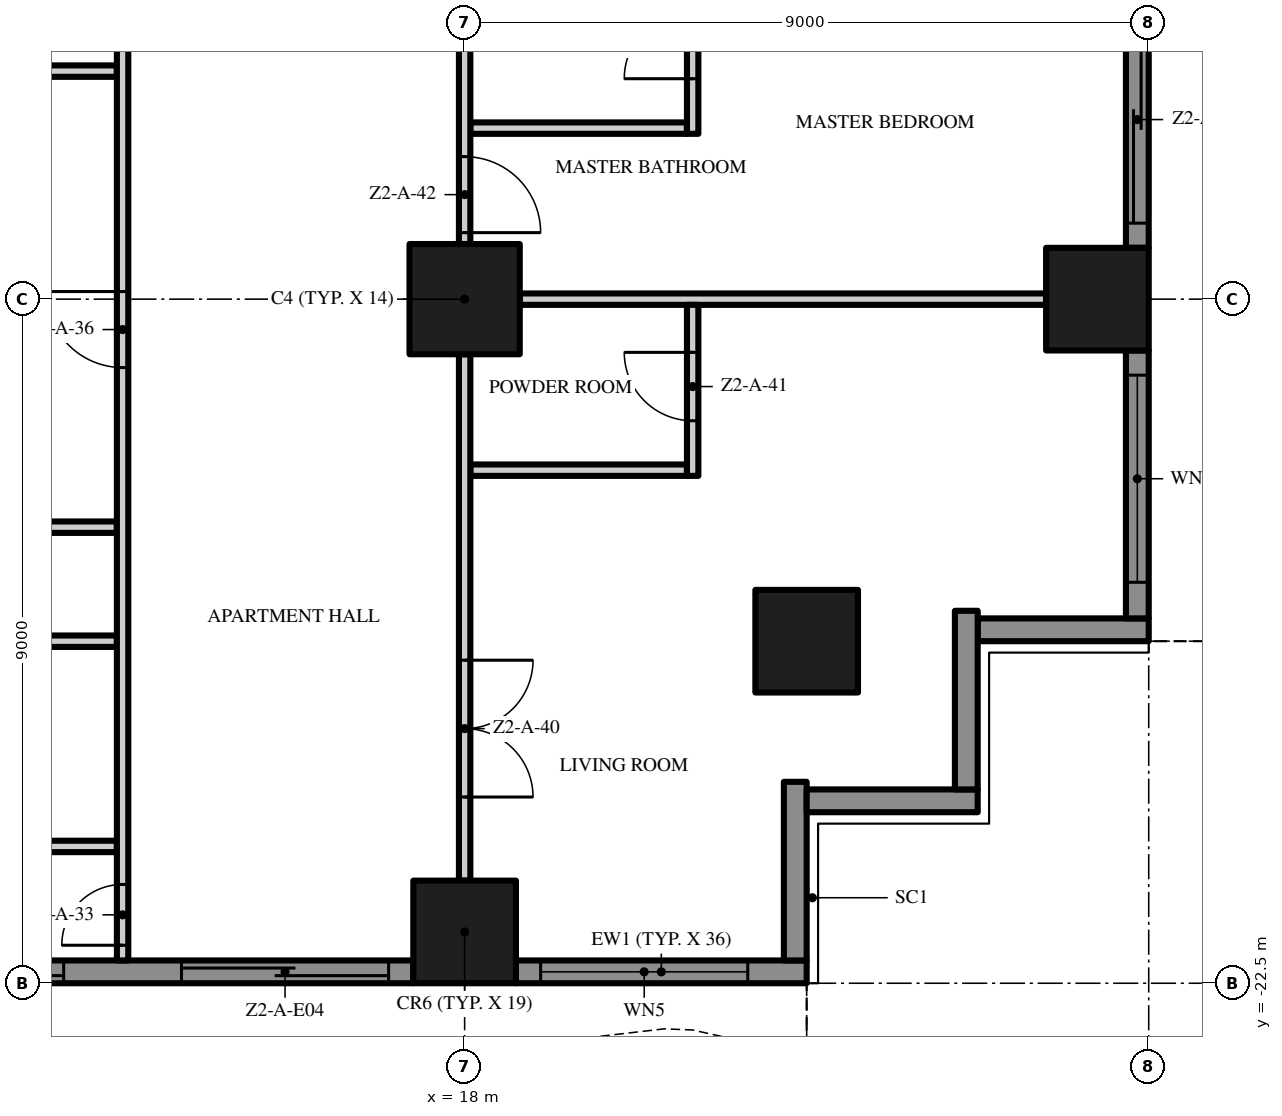
"""IFC4 building model, lengths in metres.
Left out: names, types, materials, properties, quantities, classifications, styles, units other than length and angle.
Written with IfcOpenShell. Run it as: python <this file> out.ifc"""

import sys

from ifc_helpers import new_model, si_unit, direction, frame, frame_2d, origin, origin_2d, place, context, subcontext, project, spatial, polyline, rectangle, outline, extrude, element, fill, save


model = new_model("IFC4")
c1 = context("Model", 3, precision=1e-05, world=origin(), true_north=direction((0.0, 1.0)))
c2 = subcontext(c1, "Body", "Model", "MODEL_VIEW")
j1 = project(units=[si_unit("LENGTHUNIT", "METRE"), si_unit("PLANEANGLEUNIT", "RADIAN")], contexts=[c1])
p1 = place(None, origin())
s1 = spatial("IfcSite", under=j1, at=p1, CompositionType="ELEMENT")
p2 = place(p1, origin())
s2 = spatial("IfcBuilding", under=s1, at=p2, CompositionType="ELEMENT")
p3 = place(p2, frame((0.0, 0.0, 73.2)))
s3 = spatial("IfcBuildingStorey", under=s2, at=p3, CompositionType="ELEMENT", Elevation=73.2)
p4 = place(p3, frame((18.0, -13.5, 0.0), z_axis=(0.0, 0.0, 1.0), x_axis=(1.0, 0.0, 0.0)))
e1 = element("IfcColumn", 1, at=p4, inside=s3, PredefinedType="COLUMN", context=c2, shape_type="SweptSolid", body=[
    extrude(rectangle(XDim=1.45, YDim=1.45, at=origin_2d()), origin(), (0.0, 0.0, 1.0), 3.5),
])
for number, where, z_axis, x_axis in (
    (2, (18.0, -21.825, 0.0), (0.0, 0.0, 1.0), (1.0, 0.0, 0.0)),
    (3, (26.325, -13.5, 0.0), (0.0, 0.0, 1.0), (1.0, 0.0, 0.0)),
    (4, (22.5, -18.0, 0.0), (0.0, 0.0, 1.0), (1.0, 0.0, 0.0)),
):
    element("IfcColumn", number, at=place(p3, frame(where, z_axis=z_axis, x_axis=x_axis)), inside=s3, PredefinedType="COLUMN", context=c2, shape_type="SweptSolid", body=[
        extrude(rectangle(XDim=1.35, YDim=1.35, at=origin_2d()), origin(), (0.0, 0.0, 1.0), 3.5),
    ])
p5 = place(p3, frame((17.325, -22.35, 0.0), z_axis=(0.0, 0.0, 1.0), x_axis=(-1.0, 0.0, 0.0)))
e5 = element("IfcWall", 5, at=p5, inside=s3, PredefinedType="SOLIDWALL", context=c2, shape_type="SweptSolid", body=[
    extrude(rectangle(XDim=7.65, YDim=0.3, at=frame_2d((3.825, 0.0))), origin(), (0.0, 0.0, 1.0), 3.5),
])
p6 = place(p5, frame((4.6, 0.0, 0.0)))
e6 = element("IfcOpeningElement", 6, at=p6, cuts=e5, PredefinedType="OPENING", context=c2, shape_type="SweptSolid", body=[
    extrude(rectangle(XDim=2.725, YDim=2.4, at=frame_2d((1.363, 1.2))), frame((0.0, 0.16, 0.0), z_axis=(0.0, -1.0, 0.0), x_axis=(1.0, 0.0, 0.0)), (0.0, 0.0, 1.0), 0.32),
])
p7 = place(p5, frame((0.325, 0.0, 0.0)))
e7 = element("IfcOpeningElement", 7, at=p7, cuts=e5, PredefinedType="OPENING", context=c2, shape_type="SweptSolid", body=[
    extrude(rectangle(XDim=2.725, YDim=2.4, at=frame_2d((1.363, 1.2))), frame((0.0, 0.16, 0.0), z_axis=(0.0, -1.0, 0.0), x_axis=(1.0, 0.0, 0.0)), (0.0, 0.0, 1.0), 0.32),
])
p8 = place(p3, frame((22.5, -22.35, 0.0), z_axis=(0.0, 0.0, 1.0), x_axis=(-1.0, 0.0, 0.0)))
e8 = element("IfcWall", 8, at=p8, inside=s3, PredefinedType="SOLIDWALL", context=c2, shape_type="SweptSolid", body=[
    extrude(rectangle(XDim=3.825, YDim=0.3, at=frame_2d((1.913, 0.0))), origin(), (0.0, 0.0, 1.0), 3.5),
])
p9 = place(p8, frame((0.775, 0.0, 0.45)))
e9 = element("IfcOpeningElement", 9, at=p9, cuts=e8, PredefinedType="OPENING", context=c2, shape_type="SweptSolid", body=[
    extrude(rectangle(XDim=2.725, YDim=2.65, at=frame_2d((1.363, 1.325))), frame((0.0, 0.16, 0.0), z_axis=(0.0, -1.0, 0.0), x_axis=(1.0, 0.0, 0.0)), (0.0, 0.0, 1.0), 0.32),
])
p10 = place(p3, frame((22.35, -19.85, 0.0), z_axis=(0.0, 0.0, 1.0), x_axis=(0.0, -1.0, 0.0)))
e10 = element("IfcWall", 10, at=p10, inside=s3, PredefinedType="SOLIDWALL", context=c2, shape_type="SweptSolid", body=[
    extrude(rectangle(XDim=2.35, YDim=0.3, at=frame_2d((1.175, 0.0))), origin(), (0.0, 0.0, 1.0), 3.5),
])
p11 = place(p3, frame((24.75, -20.1, 0.0), z_axis=(0.0, 0.0, 1.0), x_axis=(-1.0, 0.0, 0.0)))
e11 = element("IfcWall", 11, at=p11, inside=s3, PredefinedType="SOLIDWALL", context=c2, shape_type="SweptSolid", body=[
    extrude(rectangle(XDim=2.25, YDim=0.3, at=frame_2d((1.125, 0.0))), origin(), (0.0, 0.0, 1.0), 3.5),
])
p12 = place(p3, frame((24.6, -17.6, 0.0), z_axis=(0.0, 0.0, 1.0), x_axis=(0.0, -1.0, 0.0)))
e12 = element("IfcWall", 12, at=p12, inside=s3, PredefinedType="SOLIDWALL", context=c2, shape_type="SweptSolid", body=[
    extrude(rectangle(XDim=2.35, YDim=0.3, at=frame_2d((1.175, 0.0))), origin(), (0.0, 0.0, 1.0), 3.5),
])
p13 = place(p3, frame((27.0, -17.85, 0.0), z_axis=(0.0, 0.0, 1.0), x_axis=(-1.0, 0.0, 0.0)))
e13 = element("IfcWall", 13, at=p13, inside=s3, PredefinedType="SOLIDWALL", context=c2, shape_type="SweptSolid", body=[
    extrude(rectangle(XDim=2.25, YDim=0.3, at=frame_2d((1.125, 0.0))), origin(), (0.0, 0.0, 1.0), 3.5),
])
p14 = place(p3, frame((26.85, -14.175, 0.0), z_axis=(0.0, 0.0, 1.0), x_axis=(0.0, -1.0, 0.0)))
e14 = element("IfcWall", 14, at=p14, inside=s3, PredefinedType="SOLIDWALL", context=c2, shape_type="SweptSolid", body=[
    extrude(rectangle(XDim=3.525, YDim=0.3, at=frame_2d((1.762, 0.0))), origin(), (0.0, 0.0, 1.0), 3.5),
])
p15 = place(p14, frame((0.325, 0.0, 0.45)))
e15 = element("IfcOpeningElement", 15, at=p15, cuts=e14, PredefinedType="OPENING", context=c2, shape_type="SweptSolid", body=[
    extrude(rectangle(XDim=2.725, YDim=2.65, at=frame_2d((1.363, 1.325))), frame((0.0, 0.16, 0.0), z_axis=(0.0, -1.0, 0.0), x_axis=(1.0, 0.0, 0.0)), (0.0, 0.0, 1.0), 0.32),
])
p16 = place(p3, frame((26.85, -5.175, 0.0), z_axis=(0.0, 0.0, 1.0), x_axis=(0.0, -1.0, 0.0)))
e16 = element("IfcWall", 16, at=p16, inside=s3, PredefinedType="SOLIDWALL", context=c2, shape_type="SweptSolid", body=[
    extrude(rectangle(XDim=7.65, YDim=0.3, at=frame_2d((3.825, 0.0))), origin(), (0.0, 0.0, 1.0), 3.5),
])
p17 = place(p16, frame((4.6, 0.0, 0.0)))
e17 = element("IfcOpeningElement", 17, at=p17, cuts=e16, PredefinedType="OPENING", context=c2, shape_type="SweptSolid", body=[
    extrude(rectangle(XDim=2.725, YDim=2.4, at=frame_2d((1.363, 1.2))), frame((0.0, 0.16, 0.0), z_axis=(0.0, -1.0, 0.0), x_axis=(1.0, 0.0, 0.0)), (0.0, 0.0, 1.0), 0.32),
])
p18 = place(p16, frame((0.325, 0.0, 0.45)))
e18 = element("IfcOpeningElement", 18, at=p18, cuts=e16, PredefinedType="OPENING", context=c2, shape_type="SweptSolid", body=[
    extrude(rectangle(XDim=2.725, YDim=2.65, at=frame_2d((1.363, 1.325))), frame((0.0, 0.16, 0.0), z_axis=(0.0, -1.0, 0.0), x_axis=(1.0, 0.0, 0.0)), (0.0, 0.0, 1.0), 0.32),
])
p19 = place(p3, origin())
e19 = element("IfcWall", 19, at=p19, inside=s3, PredefinedType="USERDEFINED", context=c2, shape_type="SweptSolid", body=[
    extrude(outline(polyline([(-22.5, -23.451), (-21.0, -24.112), (-19.5, -24.845), (-18.0, -25.369), (-16.875, -25.5), (-16.5, -25.485), (-15.0, -25.149), (-13.5, -24.488), (-12.0, -23.755), (-10.5, -23.231), (-9.375, -23.1), (-9.0, -23.115), (-7.5, -23.451), (-6.0, -24.112), (-4.5, -24.845), (-3.0, -25.369), (-1.875, -25.5), (-1.5, -25.485), (0.0, -25.149), (1.5, -24.488), (3.0, -23.755), (4.5, -23.231), (5.625, -23.1), (6.0, -23.115), (7.5, -23.451), (9.0, -24.112), (10.5, -24.845), (12.0, -25.369), (13.125, -25.5), (13.5, -25.485), (15.0, -25.149), (16.5, -24.488), (18.0, -23.755), (19.5, -23.231), (20.625, -23.1), (21.0, -23.115), (22.5, -23.451), (22.555, -23.208), (21.033, -22.866), (20.615, -22.849), (19.444, -22.986), (17.904, -23.524), (16.395, -24.261), (14.921, -24.91), (13.467, -25.236), (13.135, -25.249), (12.056, -25.124), (10.596, -24.614), (9.105, -23.885), (7.579, -23.213), (6.033, -22.866), (5.615, -22.849), (4.444, -22.986), (2.904, -23.524), (1.395, -24.261), (-0.079, -24.91), (-1.533, -25.236), (-1.865, -25.249), (-2.944, -25.124), (-4.404, -24.614), (-5.895, -23.885), (-7.421, -23.213), (-8.967, -22.866), (-9.385, -22.849), (-10.556, -22.986), (-12.096, -23.524), (-13.605, -24.261), (-15.079, -24.91), (-16.533, -25.236), (-16.865, -25.249), (-17.944, -25.124), (-19.404, -24.614), (-20.895, -23.885), (-22.399, -23.223), (-22.5, -23.451)])), origin(), (0.0, 0.0, 1.0), 0.9),
])
p20 = place(p3, origin())
e20 = element("IfcWall", 20, at=p20, inside=s3, PredefinedType="USERDEFINED", context=c2, shape_type="SweptSolid", body=[
    extrude(outline(polyline([(27.951, -18.0), (28.612, -16.5), (29.345, -15.0), (29.869, -13.5), (30.0, -12.375), (29.985, -12.0), (29.649, -10.5), (28.988, -9.0), (28.255, -7.5), (27.731, -6.0), (27.6, -4.875), (27.615, -4.5), (27.951, -3.0), (28.612, -1.5), (29.345, 0.0), (29.869, 1.5), (30.0, 2.625), (29.985, 3.0), (29.649, 4.5), (28.988, 6.0), (28.255, 7.5), (27.731, 9.0), (27.6, 10.125), (27.615, 10.5), (27.951, 12.0), (28.612, 13.5), (29.345, 15.0), (29.869, 16.5), (30.0, 17.625), (29.985, 18.0), (29.735, 17.99), (29.749, 17.635), (29.624, 16.556), (29.114, 15.096), (28.385, 13.605), (27.713, 12.079), (27.366, 10.533), (27.349, 10.115), (27.486, 8.944), (28.024, 7.404), (28.761, 5.895), (29.41, 4.421), (29.736, 2.967), (29.749, 2.635), (29.624, 1.556), (29.114, 0.096), (28.385, -1.395), (27.713, -2.921), (27.366, -4.467), (27.349, -4.885), (27.486, -6.056), (28.024, -7.596), (28.761, -9.105), (29.41, -10.579), (29.736, -12.033), (29.749, -12.365), (29.624, -13.444), (29.114, -14.904), (28.385, -16.395), (27.723, -17.899), (27.951, -18.0)])), origin(), (0.0, 0.0, 1.0), 0.9),
])
for number, where, z_axis, x_axis in (
    (21, (9.075, -20.7, 0.0), (0.0, 0.0, 1.0), (1.0, 0.0, 0.0)),
    (22, (9.075, -18.0, 0.0), (0.0, 0.0, 1.0), (1.0, 0.0, 0.0)),
    (23, (9.075, -16.5, 0.0), (0.0, 0.0, 1.0), (1.0, 0.0, 0.0)),
):
    element("IfcWall", number, at=place(p3, frame(where, z_axis=z_axis, x_axis=x_axis)), inside=s3, PredefinedType="PARTITIONING", context=c2, shape_type="SweptSolid", body=[
        extrude(rectangle(XDim=4.35, YDim=0.15, at=frame_2d((2.175, 0.0))), origin(), (0.0, 0.0, 1.0), 3.5),
    ])
p21 = place(p3, frame((18.075, -15.75, 0.0), z_axis=(0.0, 0.0, 1.0), x_axis=(1.0, 0.0, 0.0)))
e24 = element("IfcWall", 24, at=p21, inside=s3, PredefinedType="PARTITIONING", context=c2, shape_type="SweptSolid", body=[
    extrude(rectangle(XDim=2.85, YDim=0.15, at=frame_2d((1.425, 0.0))), origin(), (0.0, 0.0, 1.0), 3.5),
])
p22 = place(p3, frame((18.725, -13.5, 0.0), z_axis=(0.0, 0.0, 1.0), x_axis=(1.0, 0.0, 0.0)))
e25 = element("IfcWall", 25, at=p22, inside=s3, PredefinedType="PARTITIONING", context=c2, shape_type="SweptSolid", body=[
    extrude(rectangle(XDim=6.925, YDim=0.15, at=frame_2d((3.462, 0.0))), origin(), (0.0, 0.0, 1.0), 3.5),
])
p23 = place(p3, frame((18.075, -11.25, 0.0), z_axis=(0.0, 0.0, 1.0), x_axis=(1.0, 0.0, 0.0)))
e26 = element("IfcWall", 26, at=p23, inside=s3, PredefinedType="PARTITIONING", context=c2, shape_type="SweptSolid", body=[
    extrude(rectangle(XDim=2.85, YDim=0.15, at=frame_2d((1.425, 0.0))), origin(), (0.0, 0.0, 1.0), 3.5),
])
p24 = place(p3, frame((9.075, -10.5, 0.0), z_axis=(0.0, 0.0, 1.0), x_axis=(1.0, 0.0, 0.0)))
e27 = element("IfcWall", 27, at=p24, inside=s3, PredefinedType="PARTITIONING", context=c2, shape_type="SweptSolid", body=[
    extrude(rectangle(XDim=4.35, YDim=0.15, at=frame_2d((2.175, 0.0))), origin(), (0.0, 0.0, 1.0), 3.5),
])
p25 = place(p3, frame((13.5, -22.2, 0.0), z_axis=(0.0, 0.0, 1.0), x_axis=(0.0, 1.0, 0.0)))
e28 = element("IfcWall", 28, at=p25, inside=s3, PredefinedType="PARTITIONING", context=c2, shape_type="SweptSolid", body=[
    extrude(rectangle(XDim=14.025, YDim=0.15, at=frame_2d((7.013, 0.0))), origin(), (0.0, 0.0, 1.0), 3.5),
])
p26 = place(p25, frame((0.2, 0.0, 0.0)))
e29 = element("IfcOpeningElement", 29, at=p26, cuts=e28, PredefinedType="OPENING", context=c2, shape_type="SweptSolid", body=[
    extrude(rectangle(XDim=0.8, YDim=2.0, at=frame_2d((0.4, 1.0))), frame((0.0, 0.085, 0.0), z_axis=(0.0, -1.0, 0.0), x_axis=(1.0, 0.0, 0.0)), (0.0, 0.0, 1.0), 0.17),
])
p27 = place(p25, frame((7.8, 0.0, 0.0)))
e30 = element("IfcOpeningElement", 30, at=p27, cuts=e28, PredefinedType="OPENING", context=c2, shape_type="SweptSolid", body=[
    extrude(rectangle(XDim=1.0, YDim=2.4, at=frame_2d((0.5, 1.2))), frame((0.0, 0.085, 0.0), z_axis=(0.0, -1.0, 0.0), x_axis=(1.0, 0.0, 0.0)), (0.0, 0.0, 1.0), 0.17),
])
p28 = place(p3, frame((18.0, -14.225, 0.0), z_axis=(0.0, 0.0, 1.0), x_axis=(0.0, -1.0, 0.0)))
e31 = element("IfcWall", 31, at=p28, inside=s3, PredefinedType="PARTITIONING", context=c2, shape_type="SweptSolid", body=[
    extrude(rectangle(XDim=6.925, YDim=0.15, at=frame_2d((3.462, 0.0))), origin(), (0.0, 0.0, 1.0), 3.5),
])
p29 = place(p28, frame((4.025, 0.0, 0.0)))
e32 = element("IfcOpeningElement", 32, at=p29, cuts=e31, PredefinedType="OPENING", context=c2, shape_type="SweptSolid", body=[
    extrude(rectangle(XDim=1.8, YDim=2.4, at=frame_2d((0.9, 1.2))), frame((0.0, 0.085, 0.0), z_axis=(0.0, -1.0, 0.0), x_axis=(1.0, 0.0, 0.0)), (0.0, 0.0, 1.0), 0.17),
])
p30 = place(p3, frame((18.0, -5.225, 0.0), z_axis=(0.0, 0.0, 1.0), x_axis=(0.0, -1.0, 0.0)))
e33 = element("IfcWall", 33, at=p30, inside=s3, PredefinedType="PARTITIONING", context=c2, shape_type="SweptSolid", body=[
    extrude(rectangle(XDim=7.55, YDim=0.15, at=frame_2d((3.775, 0.0))), origin(), (0.0, 0.0, 1.0), 3.5),
])
p31 = place(p30, frame((6.4, 0.0, 0.0)))
e34 = element("IfcOpeningElement", 34, at=p31, cuts=e33, PredefinedType="OPENING", context=c2, shape_type="SweptSolid", body=[
    extrude(rectangle(XDim=1.0, YDim=2.4, at=frame_2d((0.5, 1.2))), frame((0.0, 0.085, 0.0), z_axis=(0.0, -1.0, 0.0), x_axis=(1.0, 0.0, 0.0)), (0.0, 0.0, 1.0), 0.17),
])
p32 = place(p30, frame((0.15, 0.0, 0.0)))
e35 = element("IfcOpeningElement", 35, at=p32, cuts=e33, PredefinedType="OPENING", context=c2, shape_type="SweptSolid", body=[
    extrude(rectangle(XDim=1.0, YDim=2.4, at=frame_2d((0.5, 1.2))), frame((0.0, 0.085, 0.0), z_axis=(0.0, -1.0, 0.0), x_axis=(1.0, 0.0, 0.0)), (0.0, 0.0, 1.0), 0.17),
])
p33 = place(p3, frame((21.0, -15.825, 0.0), z_axis=(0.0, 0.0, 1.0), x_axis=(0.0, 1.0, 0.0)))
e36 = element("IfcWall", 36, at=p33, inside=s3, PredefinedType="PARTITIONING", context=c2, shape_type="SweptSolid", body=[
    extrude(rectangle(XDim=2.25, YDim=0.15, at=frame_2d((1.125, 0.0))), origin(), (0.0, 0.0, 1.0), 3.5),
])
p34 = place(p33, frame((0.725, 0.0, 0.0)))
e37 = element("IfcOpeningElement", 37, at=p34, cuts=e36, PredefinedType="OPENING", context=c2, shape_type="SweptSolid", body=[
    extrude(rectangle(XDim=0.9, YDim=2.1, at=frame_2d((0.45, 1.05))), frame((0.0, 0.085, 0.0), z_axis=(0.0, -1.0, 0.0), x_axis=(1.0, 0.0, 0.0)), (0.0, 0.0, 1.0), 0.17),
])
p35 = place(p3, frame((21.0, -11.325, 0.0), z_axis=(0.0, 0.0, 1.0), x_axis=(0.0, 1.0, 0.0)))
e38 = element("IfcWall", 38, at=p35, inside=s3, PredefinedType="PARTITIONING", context=c2, shape_type="SweptSolid", body=[
    extrude(rectangle(XDim=4.65, YDim=0.15, at=frame_2d((2.325, 0.0))), origin(), (0.0, 0.0, 1.0), 3.5),
])
p36 = place(p35, frame((0.725, 0.0, 0.0)))
e39 = element("IfcOpeningElement", 39, at=p36, cuts=e38, PredefinedType="OPENING", context=c2, shape_type="SweptSolid", body=[
    extrude(rectangle(XDim=0.9, YDim=2.1, at=frame_2d((0.45, 1.05))), frame((0.0, 0.085, 0.0), z_axis=(0.0, -1.0, 0.0), x_axis=(1.0, 0.0, 0.0)), (0.0, 0.0, 1.0), 0.17),
])
p37 = place(p35, frame((3.025, 0.0, 0.0)))
e40 = element("IfcOpeningElement", 40, at=p37, cuts=e38, PredefinedType="OPENING", context=c2, shape_type="SweptSolid", body=[
    extrude(rectangle(XDim=0.9, YDim=2.1, at=frame_2d((0.45, 1.05))), frame((0.0, 0.085, 0.0), z_axis=(0.0, -1.0, 0.0), x_axis=(1.0, 0.0, 0.0)), (0.0, 0.0, 1.0), 0.17),
])
p38 = place(p6, origin())
e41 = element("IfcDoor", 41, at=p38, inside=s3, OperationType="SINGLE_SWING_LEFT", PredefinedType="DOOR", context=c2, shape_type="SweptSolid", body=[
    extrude(rectangle(XDim=2.725, YDim=2.4, at=frame_2d((1.363, 1.2))), frame((0.0, 0.025, 0.0), z_axis=(0.0, -1.0, 0.0), x_axis=(1.0, 0.0, 0.0)), (0.0, 0.0, 1.0), 0.05),
])
fill(e6, e41)
p39 = place(p7, origin())
e42 = element("IfcDoor", 42, at=p39, inside=s3, OperationType="SINGLE_SWING_LEFT", PredefinedType="DOOR", context=c2, shape_type="SweptSolid", body=[
    extrude(rectangle(XDim=2.725, YDim=2.4, at=frame_2d((1.363, 1.2))), frame((0.0, 0.025, 0.0), z_axis=(0.0, -1.0, 0.0), x_axis=(1.0, 0.0, 0.0)), (0.0, 0.0, 1.0), 0.05),
])
fill(e7, e42)
p40 = place(p9, origin())
e43 = element("IfcWindow", 43, at=p40, inside=s3, PartitioningType="SINGLE_PANEL", PredefinedType="WINDOW", context=c2, shape_type="SweptSolid", body=[
    extrude(rectangle(XDim=2.725, YDim=2.65, at=frame_2d((1.363, 1.325))), frame((0.0, 0.03, 0.0), z_axis=(0.0, -1.0, 0.0), x_axis=(1.0, 0.0, 0.0)), (0.0, 0.0, 1.0), 0.06),
])
fill(e9, e43)
p41 = place(p15, origin())
e44 = element("IfcWindow", 44, at=p41, inside=s3, PartitioningType="SINGLE_PANEL", PredefinedType="WINDOW", context=c2, shape_type="SweptSolid", body=[
    extrude(rectangle(XDim=2.725, YDim=2.65, at=frame_2d((1.363, 1.325))), frame((0.0, 0.03, 0.0), z_axis=(0.0, -1.0, 0.0), x_axis=(1.0, 0.0, 0.0)), (0.0, 0.0, 1.0), 0.06),
])
fill(e15, e44)
p42 = place(p17, origin())
e45 = element("IfcDoor", 45, at=p42, inside=s3, OperationType="SINGLE_SWING_LEFT", PredefinedType="DOOR", context=c2, shape_type="SweptSolid", body=[
    extrude(rectangle(XDim=2.725, YDim=2.4, at=frame_2d((1.363, 1.2))), frame((0.0, 0.025, 0.0), z_axis=(0.0, -1.0, 0.0), x_axis=(1.0, 0.0, 0.0)), (0.0, 0.0, 1.0), 0.05),
])
fill(e17, e45)
p43 = place(p26, origin())
e46 = element("IfcDoor", 46, at=p43, inside=s3, OperationType="SINGLE_SWING_LEFT", PredefinedType="DOOR", context=c2, shape_type="SweptSolid", body=[
    extrude(rectangle(XDim=0.8, YDim=2.0, at=frame_2d((0.4, 1.0))), frame((0.0, 0.025, 0.0), z_axis=(0.0, -1.0, 0.0), x_axis=(1.0, 0.0, 0.0)), (0.0, 0.0, 1.0), 0.05),
])
fill(e29, e46)
p44 = place(p27, origin())
e47 = element("IfcDoor", 47, at=p44, inside=s3, OperationType="SINGLE_SWING_RIGHT", PredefinedType="DOOR", context=c2, shape_type="SweptSolid", body=[
    extrude(rectangle(XDim=1.0, YDim=2.4, at=frame_2d((0.5, 1.2))), frame((0.0, 0.025, 0.0), z_axis=(0.0, -1.0, 0.0), x_axis=(1.0, 0.0, 0.0)), (0.0, 0.0, 1.0), 0.05),
])
fill(e30, e47)
p45 = place(p29, origin())
e48 = element("IfcDoor", 48, at=p45, inside=s3, OperationType="DOUBLE_DOOR_SINGLE_SWING", PredefinedType="DOOR", context=c2, shape_type="SweptSolid", body=[
    extrude(rectangle(XDim=1.8, YDim=2.4, at=frame_2d((0.9, 1.2))), frame((0.0, 0.025, 0.0), z_axis=(0.0, -1.0, 0.0), x_axis=(1.0, 0.0, 0.0)), (0.0, 0.0, 1.0), 0.05),
])
fill(e32, e48)
p46 = place(p34, origin())
e49 = element("IfcDoor", 49, at=p46, inside=s3, OperationType="SINGLE_SWING_RIGHT", PredefinedType="DOOR", context=c2, shape_type="SweptSolid", body=[
    extrude(rectangle(XDim=0.9, YDim=2.1, at=frame_2d((0.45, 1.05))), frame((0.0, 0.025, 0.0), z_axis=(0.0, -1.0, 0.0), x_axis=(1.0, 0.0, 0.0)), (0.0, 0.0, 1.0), 0.05),
])
fill(e37, e49)
p47 = place(p31, origin())
e50 = element("IfcDoor", 50, at=p47, inside=s3, OperationType="SINGLE_SWING_RIGHT", PredefinedType="DOOR", context=c2, shape_type="SweptSolid", body=[
    extrude(rectangle(XDim=1.0, YDim=2.4, at=frame_2d((0.5, 1.2))), frame((0.0, 0.025, 0.0), z_axis=(0.0, -1.0, 0.0), x_axis=(1.0, 0.0, 0.0)), (0.0, 0.0, 1.0), 0.05),
])
fill(e34, e50)
p48 = place(p36, origin())
e51 = element("IfcDoor", 51, at=p48, inside=s3, OperationType="SINGLE_SWING_LEFT", PredefinedType="DOOR", context=c2, shape_type="SweptSolid", body=[
    extrude(rectangle(XDim=0.9, YDim=2.1, at=frame_2d((0.45, 1.05))), frame((0.0, 0.025, 0.0), z_axis=(0.0, -1.0, 0.0), x_axis=(1.0, 0.0, 0.0)), (0.0, 0.0, 1.0), 0.05),
])
fill(e39, e51)
save(model, sys.argv[1])
